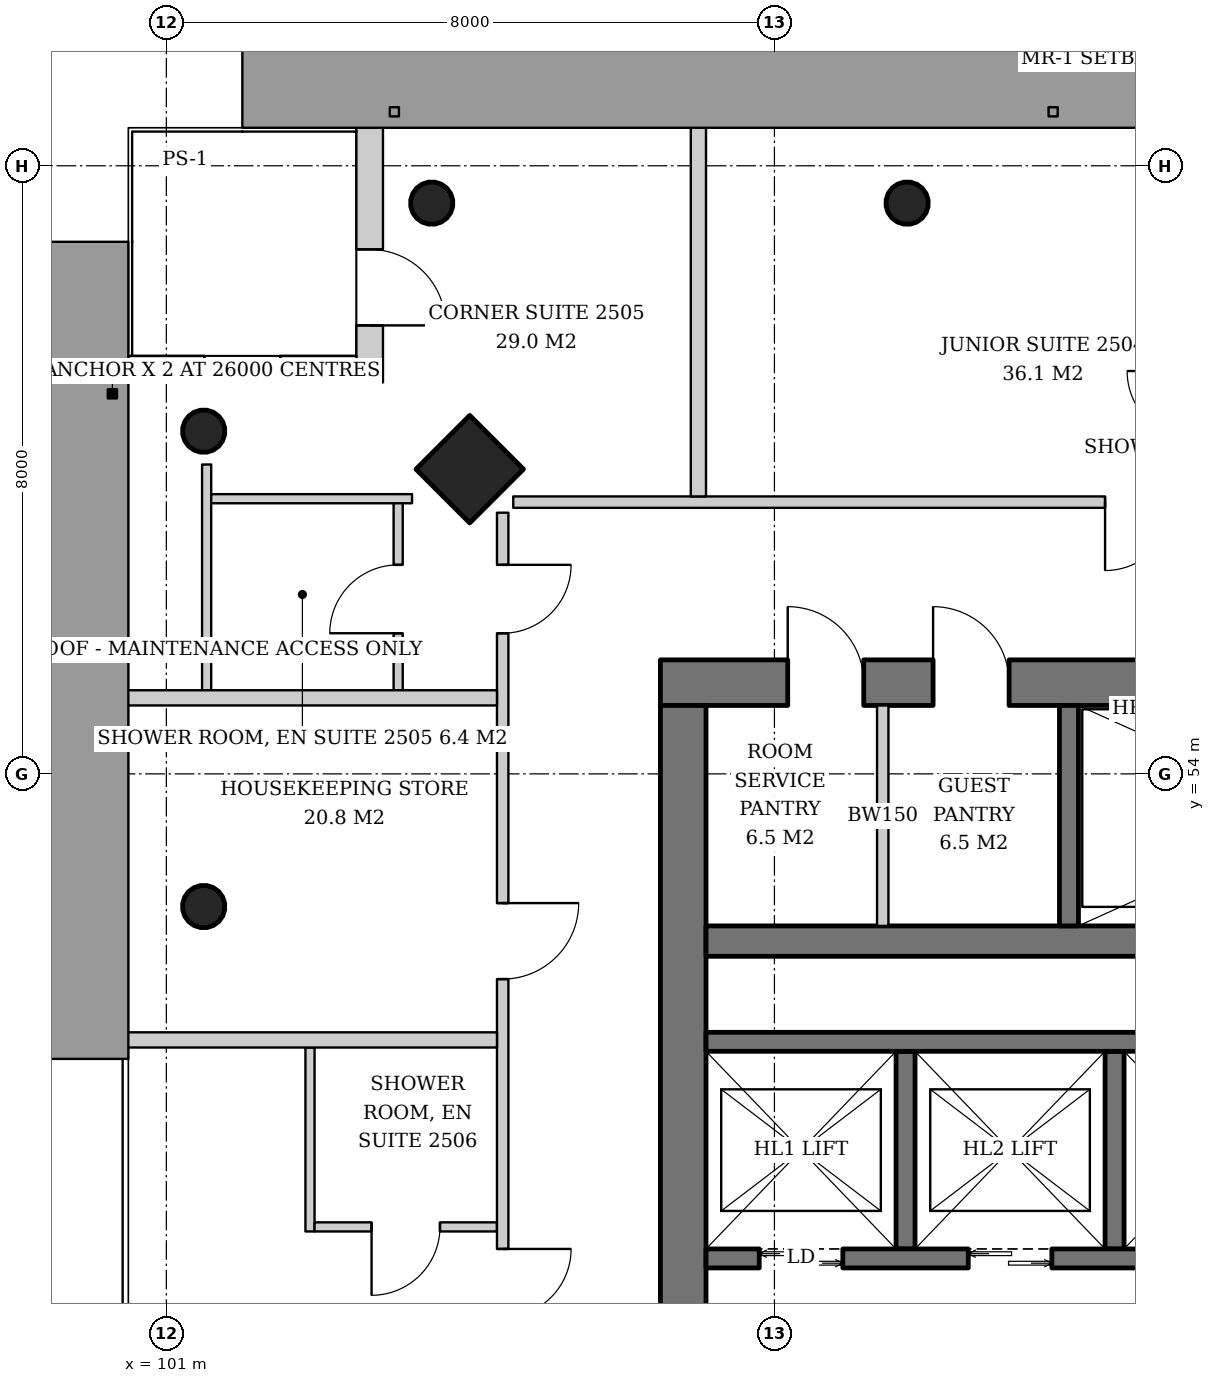
"""IFC4 building model, lengths in metres.
Left out: names, types, materials, properties, quantities, classifications, styles, units other than length and angle.
Written with IfcOpenShell. Run it as: python <this file> out.ifc"""

import sys

from ifc_helpers import new_model, si_unit, direction, frame, frame_2d, origin, origin_2d, place, context, subcontext, project, spatial, rectangle, hollow_circle, extrude, element, fill, save


model = new_model("IFC4")
c1 = context("Model", 3, precision=1e-05, world=origin(), true_north=direction((0.0, 1.0)))
c2 = subcontext(c1, "Body", "Model", "MODEL_VIEW")
j1 = project(units=[si_unit("LENGTHUNIT", "METRE"), si_unit("PLANEANGLEUNIT", "RADIAN")], contexts=[c1])
p1 = place(None, origin())
s1 = spatial("IfcSite", under=j1, at=p1, CompositionType="ELEMENT")
p2 = place(p1, origin())
s2 = spatial("IfcBuilding", under=s1, at=p2, CompositionType="ELEMENT")
p3 = place(p2, frame((0.0, 0.0, 100.8)))
s3 = spatial("IfcBuildingStorey", under=s2, at=p3, CompositionType="ELEMENT", Elevation=100.8)
p4 = place(p3, frame((104.94, 58.06, 0.0), z_axis=(0.043029647111, -0.043029647111, 0.998146732169), x_axis=(0.707106781187, 0.707106781187, 0.0)))
e1 = element("IfcColumn", 1, at=p4, inside=s3, PredefinedType="COLUMN", context=c2, shape_type="SweptSolid", body=[
    extrude(rectangle(XDim=1.0, YDim=1.0, at=origin_2d()), origin(), (0.0, 0.0, 1.0), 3.807),
])
p5 = place(p3, frame((104.44, 61.56, 0.0), z_axis=(0.043029647111, -0.043029647111, 0.998146732169), x_axis=(0.707106781187, 0.707106781187, 0.0)))
e2 = element("IfcColumn", 2, at=p5, inside=s3, PredefinedType="COLUMN", context=c2, shape_type="SweptSolid", body=[
    extrude(hollow_circle(Radius=0.28, WallThickness=0.02, at=origin_2d()), origin(), (0.0, 0.0, 1.0), 3.807),
])
p6 = place(p3, frame((110.72, 61.56, 0.0), z_axis=(0.021561848751, -0.043059525333, 0.998839808957), x_axis=(0.894160516368, 0.44774654769, 0.0)))
e3 = element("IfcColumn", 3, at=p6, inside=s3, PredefinedType="COLUMN", context=c2, shape_type="SweptSolid", body=[
    extrude(hollow_circle(Radius=0.28, WallThickness=0.02, at=origin_2d()), origin(), (0.0, 0.0, 1.0), 3.804),
])
p7 = place(p3, frame((101.44, 58.56, 0.0), z_axis=(0.043029647111, -0.043029647111, 0.998146732169), x_axis=(0.707106781187, 0.707106781187, 0.0)))
e4 = element("IfcColumn", 4, at=p7, inside=s3, PredefinedType="COLUMN", context=c2, shape_type="SweptSolid", body=[
    extrude(hollow_circle(Radius=0.28, WallThickness=0.02, at=origin_2d()), origin(), (0.0, 0.0, 1.0), 3.807),
])
p8 = place(p3, frame((101.44, 52.28, 0.0), z_axis=(0.043059525333, -0.021561848751, 0.998839808957), x_axis=(0.44774654769, 0.894160516368, 0.0)))
e5 = element("IfcColumn", 5, at=p8, inside=s3, PredefinedType="COLUMN", context=c2, shape_type="SweptSolid", body=[
    extrude(hollow_circle(Radius=0.28, WallThickness=0.02, at=origin_2d()), origin(), (0.0, 0.0, 1.0), 3.804),
])
p9 = place(p3, frame((107.5, 55.2, 0.0), z_axis=(0.0, 0.0, 1.0), x_axis=(1.0, 0.0, 0.0)))
e6 = element("IfcWall", 6, at=p9, inside=s3, PredefinedType="SHEAR", context=c2, shape_type="SweptSolid", body=[
    extrude(rectangle(XDim=19.0, YDim=0.6, at=frame_2d((9.5, 0.0))), origin(), (0.0, 0.0, 1.0), 3.8),
])
p10 = place(p9, frame((14.14, 0.0, 0.0)))
e7 = element("IfcOpeningElement", 7, at=p10, cuts=e6, PredefinedType="OPENING", context=c2, shape_type="SweptSolid", body=[
    extrude(rectangle(XDim=1.0, YDim=2.1, at=frame_2d((0.5, 1.05))), frame((0.0, 0.31, 0.0), z_axis=(0.0, -1.0, 0.0), x_axis=(1.0, 0.0, 0.0)), (0.0, 0.0, 1.0), 0.62),
])
p11 = place(p9, frame((1.675, 0.0, 0.0)))
e8 = element("IfcOpeningElement", 8, at=p11, cuts=e6, PredefinedType="OPENING", context=c2, shape_type="SweptSolid", body=[
    extrude(rectangle(XDim=1.0, YDim=2.1, at=frame_2d((0.5, 1.05))), frame((0.0, 0.31, 0.0), z_axis=(0.0, -1.0, 0.0), x_axis=(1.0, 0.0, 0.0)), (0.0, 0.0, 1.0), 0.62),
])
p12 = place(p9, frame((3.587, 0.0, 0.0)))
e9 = element("IfcOpeningElement", 9, at=p12, cuts=e6, PredefinedType="OPENING", context=c2, shape_type="SweptSolid", body=[
    extrude(rectangle(XDim=1.0, YDim=2.1, at=frame_2d((0.5, 1.05))), frame((0.0, 0.31, 0.0), z_axis=(0.0, -1.0, 0.0), x_axis=(1.0, 0.0, 0.0)), (0.0, 0.0, 1.0), 0.62),
])
p13 = place(p3, frame((107.8, 37.1, 0.0), z_axis=(0.0, 0.0, 1.0), x_axis=(0.0, 1.0, 0.0)))
e10 = element("IfcWall", 10, at=p13, inside=s3, PredefinedType="SHEAR", context=c2, shape_type="SweptSolid", body=[
    extrude(rectangle(XDim=17.8, YDim=0.6, at=frame_2d((8.9, 0.0))), origin(), (0.0, 0.0, 1.0), 3.8),
])
p14 = place(p13, frame((8.0, 0.0, 0.0)))
e11 = element("IfcOpeningElement", 11, at=p14, cuts=e10, PredefinedType="OPENING", context=c2, shape_type="SweptSolid", body=[
    extrude(rectangle(XDim=1.8, YDim=2.4, at=frame_2d((0.9, 1.2))), frame((0.0, 0.31, 0.0), z_axis=(0.0, -1.0, 0.0), x_axis=(1.0, 0.0, 0.0)), (0.0, 0.0, 1.0), 0.62),
])
p15 = place(p3, frame((108.1, 51.8, 0.0), z_axis=(0.0, 0.0, 1.0), x_axis=(1.0, 0.0, 0.0)))
e12 = element("IfcWall", 12, at=p15, inside=s3, PredefinedType="SHEAR", context=c2, shape_type="SweptSolid", body=[
    extrude(rectangle(XDim=17.8, YDim=0.4, at=frame_2d((8.9, 0.0))), origin(), (0.0, 0.0, 1.0), 3.8),
])
p16 = place(p3, frame((103.675, 62.5, 0.0), z_axis=(0.0, 0.0, 1.0), x_axis=(0.0, -1.0, 0.0)))
e13 = element("IfcWall", 13, at=p16, inside=s3, PredefinedType="SOLIDWALL", context=c2, shape_type="SweptSolid", body=[
    extrude(rectangle(XDim=3.35, YDim=0.35, at=frame_2d((1.675, 0.0))), origin(), (0.0, 0.0, 1.0), 3.6),
])
p17 = place(p16, frame((1.6, 0.0, 0.0)))
e14 = element("IfcOpeningElement", 14, at=p17, cuts=e13, PredefinedType="OPENING", context=c2, shape_type="SweptSolid", body=[
    extrude(rectangle(XDim=1.0, YDim=2.4, at=frame_2d((0.5, 1.2))), frame((0.0, 0.185, 0.0), z_axis=(0.0, -1.0, 0.0), x_axis=(1.0, 0.0, 0.0)), (0.0, 0.0, 1.0), 0.37),
])
p18 = place(p3, frame((103.5, 59.325, 0.0), z_axis=(0.0, 0.0, 1.0), x_axis=(-1.0, 0.0, 0.0)))
e15 = element("IfcWall", 15, at=p18, inside=s3, PredefinedType="SOLIDWALL", context=c2, shape_type="SweptSolid", body=[
    extrude(rectangle(XDim=3.0, YDim=0.35, at=frame_2d((1.5, 0.0))), origin(), (0.0, 0.0, 1.0), 3.6),
])
p19 = place(p18, frame((1.0, 0.0, 0.9)))
e16 = element("IfcOpeningElement", 16, at=p19, cuts=e15, PredefinedType="OPENING", context=c2, shape_type="SweptSolid", body=[
    extrude(rectangle(XDim=1.0, YDim=2.4, at=frame_2d((0.5, 1.2))), frame((0.0, 0.185, 0.0), z_axis=(0.0, -1.0, 0.0), x_axis=(1.0, 0.0, 0.0)), (0.0, 0.0, 1.0), 0.37),
])
p20 = place(p3, frame((112.875, 52.0, 0.0), z_axis=(0.0, 0.0, 1.0), x_axis=(0.0, 1.0, 0.0)))
e17 = element("IfcWall", 17, at=p20, inside=s3, PredefinedType="SHEAR", context=c2, shape_type="SweptSolid", body=[
    extrude(rectangle(XDim=2.9, YDim=0.25, at=frame_2d((1.45, 0.0))), origin(), (0.0, 0.0, 1.0), 3.8),
])
for number, where, z_axis, x_axis in (
    (18, (110.725, 47.75, 0.0), (0.0, 0.0, 1.0), (0.0, 1.0, 0.0)),
    (19, (113.475, 47.75, 0.0), (0.0, 0.0, 1.0), (0.0, 1.0, 0.0)),
):
    element("IfcWall", number, at=place(p3, frame(where, z_axis=z_axis, x_axis=x_axis)), inside=s3, PredefinedType="SHEAR", context=c2, shape_type="SweptSolid", body=[
        extrude(rectangle(XDim=2.6, YDim=0.25, at=frame_2d((1.3, 0.0))), origin(), (0.0, 0.0, 1.0), 3.8),
    ])
p21 = place(p3, frame((108.1, 50.475, 0.0), z_axis=(0.0, 0.0, 1.0), x_axis=(1.0, 0.0, 0.0)))
e20 = element("IfcWall", 20, at=p21, inside=s3, PredefinedType="SHEAR", context=c2, shape_type="SweptSolid", body=[
    extrude(rectangle(XDim=11.0, YDim=0.25, at=frame_2d((5.5, 0.0))), origin(), (0.0, 0.0, 1.0), 3.8),
])
p22 = place(p3, frame((108.1, 47.625, 0.0), z_axis=(0.0, 0.0, 1.0), x_axis=(1.0, 0.0, 0.0)))
e21 = element("IfcWall", 21, at=p22, inside=s3, PredefinedType="SHEAR", context=c2, shape_type="SweptSolid", body=[
    extrude(rectangle(XDim=12.83, YDim=0.25, at=frame_2d((6.415, 0.0))), origin(), (0.0, 0.0, 1.0), 3.8),
])
p23 = place(p22, frame((0.7, 0.0, 0.0)))
e22 = element("IfcOpeningElement", 22, at=p23, cuts=e21, PredefinedType="OPENING", context=c2, shape_type="SweptSolid", body=[
    extrude(rectangle(XDim=1.1, YDim=2.2, at=frame_2d((0.55, 1.1))), frame((0.0, 0.135, 0.0), z_axis=(0.0, -1.0, 0.0), x_axis=(1.0, 0.0, 0.0)), (0.0, 0.0, 1.0), 0.27),
])
p24 = place(p22, frame((3.45, 0.0, 0.0)))
e23 = element("IfcOpeningElement", 23, at=p24, cuts=e21, PredefinedType="OPENING", context=c2, shape_type="SweptSolid", body=[
    extrude(rectangle(XDim=1.1, YDim=2.2, at=frame_2d((0.55, 1.1))), frame((0.0, 0.135, 0.0), z_axis=(0.0, -1.0, 0.0), x_axis=(1.0, 0.0, 0.0)), (0.0, 0.0, 1.0), 0.27),
])
p25 = place(p22, frame((6.2, 0.0, 0.0)))
e24 = element("IfcOpeningElement", 24, at=p25, cuts=e21, PredefinedType="OPENING", context=c2, shape_type="SweptSolid", body=[
    extrude(rectangle(XDim=1.1, YDim=2.2, at=frame_2d((0.55, 1.1))), frame((0.0, 0.135, 0.0), z_axis=(0.0, -1.0, 0.0), x_axis=(1.0, 0.0, 0.0)), (0.0, 0.0, 1.0), 0.27),
])
p26 = place(p22, frame((8.95, 0.0, 0.0)))
e25 = element("IfcOpeningElement", 25, at=p26, cuts=e21, PredefinedType="OPENING", context=c2, shape_type="SweptSolid", body=[
    extrude(rectangle(XDim=1.1, YDim=2.2, at=frame_2d((0.55, 1.1))), frame((0.0, 0.135, 0.0), z_axis=(0.0, -1.0, 0.0), x_axis=(1.0, 0.0, 0.0)), (0.0, 0.0, 1.0), 0.27),
])
p27 = place(p22, frame((11.515, 0.0, 0.0)))
e26 = element("IfcOpeningElement", 26, at=p27, cuts=e21, PredefinedType="OPENING", context=c2, shape_type="SweptSolid", body=[
    extrude(rectangle(XDim=0.8, YDim=2.0, at=frame_2d((0.4, 1.0))), frame((0.0, 0.135, 0.0), z_axis=(0.0, -1.0, 0.0), x_axis=(1.0, 0.0, 0.0)), (0.0, 0.0, 1.0), 0.27),
])
p28 = place(p3, frame((110.425, 52.0, 0.0), z_axis=(0.0, 0.0, 1.0), x_axis=(0.0, 1.0, 0.0)))
e27 = element("IfcWall", 27, at=p28, inside=s3, PredefinedType="SOLIDWALL", context=c2, shape_type="SweptSolid", body=[
    extrude(rectangle(XDim=2.9, YDim=0.15, at=frame_2d((1.45, 0.0))), origin(), (0.0, 0.0, 1.0), 3.6),
])
p29 = place(p3, frame((128.436, 57.575, 0.0), z_axis=(0.0, 0.0, 1.0), x_axis=(-1.0, 0.0, 0.0)))
e28 = element("IfcWall", 28, at=p29, inside=s3, PredefinedType="PARTITIONING", context=c2, shape_type="SweptSolid", body=[
    extrude(rectangle(XDim=22.872, YDim=0.15, at=frame_2d((11.436, 0.0))), origin(), (0.0, 0.0, 1.0), 2.9),
])
p30 = place(p29, frame((0.686, 0.0, 0.0)))
e29 = element("IfcOpeningElement", 29, at=p30, cuts=e28, PredefinedType="OPENING", context=c2, shape_type="SweptSolid", body=[
    extrude(rectangle(XDim=0.9, YDim=2.1, at=frame_2d((0.45, 1.05))), frame((0.0, 0.085, 0.0), z_axis=(0.0, -1.0, 0.0), x_axis=(1.0, 0.0, 0.0)), (0.0, 0.0, 1.0), 0.17),
])
p31 = place(p29, frame((5.136, 0.0, 0.0)))
e30 = element("IfcOpeningElement", 30, at=p31, cuts=e28, PredefinedType="OPENING", context=c2, shape_type="SweptSolid", body=[
    extrude(rectangle(XDim=1.0, YDim=2.1, at=frame_2d((0.5, 1.05))), frame((0.0, 0.085, 0.0), z_axis=(0.0, -1.0, 0.0), x_axis=(1.0, 0.0, 0.0)), (0.0, 0.0, 1.0), 0.17),
])
p32 = place(p29, frame((14.186, 0.0, 0.0)))
e31 = element("IfcOpeningElement", 31, at=p32, cuts=e28, PredefinedType="OPENING", context=c2, shape_type="SweptSolid", body=[
    extrude(rectangle(XDim=0.9, YDim=2.1, at=frame_2d((0.45, 1.05))), frame((0.0, 0.085, 0.0), z_axis=(0.0, -1.0, 0.0), x_axis=(1.0, 0.0, 0.0)), (0.0, 0.0, 1.0), 0.17),
])
p33 = place(p3, frame((108.0, 57.65, 0.0), z_axis=(0.0, 0.0, 1.0), x_axis=(0.0, 1.0, 0.0)))
e32 = element("IfcWall", 32, at=p33, inside=s3, PredefinedType="PARTITIONING", context=c2, shape_type="SweptSolid", body=[
    extrude(rectangle(XDim=4.89, YDim=0.2, at=frame_2d((2.445, 0.0))), origin(), (0.0, 0.0, 1.0), 3.2),
])
p34 = place(p3, frame((104.05, 55.1, 0.0), z_axis=(0.0, 0.0, 1.0), x_axis=(0.0, 1.0, 0.0)))
e33 = element("IfcWall", 33, at=p34, inside=s3, PredefinedType="PARTITIONING", context=c2, shape_type="SweptSolid", body=[
    extrude(rectangle(XDim=2.58, YDim=0.12, at=frame_2d((1.29, 0.0))), origin(), (0.0, 0.0, 1.0), 2.9),
])
p35 = place(p34, frame((0.75, 0.0, 0.0)))
e34 = element("IfcOpeningElement", 34, at=p35, cuts=e33, PredefinedType="OPENING", context=c2, shape_type="SweptSolid", body=[
    extrude(rectangle(XDim=0.9, YDim=2.1, at=frame_2d((0.45, 1.05))), frame((0.0, 0.07, 0.0), z_axis=(0.0, -1.0, 0.0), x_axis=(1.0, 0.0, 0.0)), (0.0, 0.0, 1.0), 0.14),
])
p36 = place(p3, frame((101.53, 55.1, 0.0), z_axis=(0.0, 0.0, 1.0), x_axis=(0.0, 1.0, 0.0)))
e35 = element("IfcWall", 35, at=p36, inside=s3, PredefinedType="PARTITIONING", context=c2, shape_type="SweptSolid", body=[
    extrude(rectangle(XDim=2.97, YDim=0.12, at=frame_2d((1.485, 0.0))), origin(), (0.0, 0.0, 1.0), 3.2),
])
p37 = place(p3, frame((104.233, 57.62, 0.0), z_axis=(0.0, 0.0, 1.0), x_axis=(-1.0, 0.0, 0.0)))
e36 = element("IfcWall", 36, at=p37, inside=s3, PredefinedType="PARTITIONING", context=c2, shape_type="SweptSolid", body=[
    extrude(rectangle(XDim=2.643, YDim=0.12, at=frame_2d((1.321, 0.0))), origin(), (0.0, 0.0, 1.0), 3.2),
])
p38 = place(p3, frame((102.89, 50.4, 0.0), z_axis=(0.0, 0.0, 1.0), x_axis=(0.0, -1.0, 0.0)))
e37 = element("IfcWall", 37, at=p38, inside=s3, PredefinedType="PARTITIONING", context=c2, shape_type="SweptSolid", body=[
    extrude(rectangle(XDim=2.42, YDim=0.12, at=frame_2d((1.21, 0.0))), origin(), (0.0, 0.0, 1.0), 3.6),
])
p39 = place(p3, frame((105.35, 48.04, 0.0), z_axis=(0.0, 0.0, 1.0), x_axis=(-1.0, 0.0, 0.0)))
e38 = element("IfcWall", 38, at=p39, inside=s3, PredefinedType="PARTITIONING", context=c2, shape_type="SweptSolid", body=[
    extrude(rectangle(XDim=2.4, YDim=0.12, at=frame_2d((1.2, 0.0))), origin(), (0.0, 0.0, 1.0), 3.6),
])
p40 = place(p39, frame((0.75, 0.0, 0.0)))
e39 = element("IfcOpeningElement", 39, at=p40, cuts=e38, PredefinedType="OPENING", context=c2, shape_type="SweptSolid", body=[
    extrude(rectangle(XDim=0.9, YDim=2.1, at=frame_2d((0.45, 1.05))), frame((0.0, 0.07, 0.0), z_axis=(0.0, -1.0, 0.0), x_axis=(1.0, 0.0, 0.0)), (0.0, 0.0, 1.0), 0.14),
])
p41 = place(p3, frame((105.425, 57.436, 0.0), z_axis=(0.0, 0.0, 1.0), x_axis=(0.0, -1.0, 0.0)))
e40 = element("IfcWall", 40, at=p41, inside=s3, PredefinedType="PARTITIONING", context=c2, shape_type="SweptSolid", body=[
    extrude(rectangle(XDim=22.872, YDim=0.15, at=frame_2d((11.436, 0.0))), origin(), (0.0, 0.0, 1.0), 2.9),
])
p42 = place(p41, frame((0.686, 0.0, 0.0)))
e41 = element("IfcOpeningElement", 41, at=p42, cuts=e40, PredefinedType="OPENING", context=c2, shape_type="SweptSolid", body=[
    extrude(rectangle(XDim=0.9, YDim=2.1, at=frame_2d((0.45, 1.05))), frame((0.0, 0.085, 0.0), z_axis=(0.0, -1.0, 0.0), x_axis=(1.0, 0.0, 0.0)), (0.0, 0.0, 1.0), 0.17),
])
p43 = place(p41, frame((5.136, 0.0, 0.0)))
e42 = element("IfcOpeningElement", 42, at=p43, cuts=e40, PredefinedType="OPENING", context=c2, shape_type="SweptSolid", body=[
    extrude(rectangle(XDim=1.0, YDim=2.1, at=frame_2d((0.5, 1.05))), frame((0.0, 0.085, 0.0), z_axis=(0.0, -1.0, 0.0), x_axis=(1.0, 0.0, 0.0)), (0.0, 0.0, 1.0), 0.17),
])
p44 = place(p41, frame((9.686, 0.0, 0.0)))
e43 = element("IfcOpeningElement", 43, at=p44, cuts=e40, PredefinedType="OPENING", context=c2, shape_type="SweptSolid", body=[
    extrude(rectangle(XDim=0.9, YDim=2.1, at=frame_2d((0.45, 1.05))), frame((0.0, 0.085, 0.0), z_axis=(0.0, -1.0, 0.0), x_axis=(1.0, 0.0, 0.0)), (0.0, 0.0, 1.0), 0.17),
])
p45 = place(p41, frame((18.636, 0.0, 0.0)))
e44 = element("IfcOpeningElement", 44, at=p45, cuts=e40, PredefinedType="OPENING", context=c2, shape_type="SweptSolid", body=[
    extrude(rectangle(XDim=1.0, YDim=2.1, at=frame_2d((0.5, 1.05))), frame((0.0, 0.085, 0.0), z_axis=(0.0, -1.0, 0.0), x_axis=(1.0, 0.0, 0.0)), (0.0, 0.0, 1.0), 0.17),
])
p46 = place(p3, frame((105.35, 55.0, 0.0), z_axis=(0.0, 0.0, 1.0), x_axis=(-1.0, 0.0, 0.0)))
e45 = element("IfcWall", 45, at=p46, inside=s3, PredefinedType="PARTITIONING", context=c2, shape_type="SweptSolid", body=[
    extrude(rectangle(XDim=4.89, YDim=0.2, at=frame_2d((2.445, 0.0))), origin(), (0.0, 0.0, 1.0), 2.9),
])
p47 = place(p3, frame((105.35, 50.5, 0.0), z_axis=(0.0, 0.0, 1.0), x_axis=(-1.0, 0.0, 0.0)))
e46 = element("IfcWall", 46, at=p47, inside=s3, PredefinedType="PARTITIONING", context=c2, shape_type="SweptSolid", body=[
    extrude(rectangle(XDim=4.89, YDim=0.2, at=frame_2d((2.445, 0.0))), origin(), (0.0, 0.0, 1.0), 3.2),
])
p48 = place(p17, origin())
e47 = element("IfcDoor", 47, at=p48, inside=s3, OperationType="SINGLE_SWING_RIGHT", PredefinedType="DOOR", context=c2, shape_type="SweptSolid", body=[
    extrude(rectangle(XDim=1.0, YDim=2.4, at=frame_2d((0.5, 1.2))), frame((0.0, 0.025, 0.0), z_axis=(0.0, -1.0, 0.0), x_axis=(1.0, 0.0, 0.0)), (0.0, 0.0, 1.0), 0.05),
])
fill(e14, e47)
p49 = place(p19, origin())
e48 = element("IfcWindow", 48, at=p49, inside=s3, PartitioningType="SINGLE_PANEL", PredefinedType="WINDOW", context=c2, shape_type="SweptSolid", body=[
    extrude(rectangle(XDim=1.0, YDim=2.4, at=frame_2d((0.5, 1.2))), frame((0.0, 0.03, 0.0), z_axis=(0.0, -1.0, 0.0), x_axis=(1.0, 0.0, 0.0)), (0.0, 0.0, 1.0), 0.06),
])
fill(e16, e48)
p50 = place(p23, origin())
e49 = element("IfcDoor", 49, at=p50, inside=s3, OperationType="DOUBLE_DOOR_SLIDING", PredefinedType="DOOR", context=c2, shape_type="SweptSolid", body=[
    extrude(rectangle(XDim=1.1, YDim=2.2, at=frame_2d((0.55, 1.1))), frame((0.0, 0.025, 0.0), z_axis=(0.0, -1.0, 0.0), x_axis=(1.0, 0.0, 0.0)), (0.0, 0.0, 1.0), 0.05),
])
fill(e22, e49)
p51 = place(p24, origin())
e50 = element("IfcDoor", 50, at=p51, inside=s3, OperationType="DOUBLE_DOOR_SLIDING", PredefinedType="DOOR", context=c2, shape_type="SweptSolid", body=[
    extrude(rectangle(XDim=1.1, YDim=2.2, at=frame_2d((0.55, 1.1))), frame((0.0, 0.025, 0.0), z_axis=(0.0, -1.0, 0.0), x_axis=(1.0, 0.0, 0.0)), (0.0, 0.0, 1.0), 0.05),
])
fill(e23, e50)
p52 = place(p11, origin())
e51 = element("IfcDoor", 51, at=p52, inside=s3, OperationType="SINGLE_SWING_LEFT", PredefinedType="DOOR", context=c2, shape_type="SweptSolid", body=[
    extrude(rectangle(XDim=1.0, YDim=2.1, at=frame_2d((0.5, 1.05))), frame((0.0, -0.24, 0.0), z_axis=(0.0, -1.0, 0.0), x_axis=(1.0, 0.0, 0.0)), (0.0, 0.0, 1.0), 0.05),
])
fill(e8, e51)
p53 = place(p12, origin())
e52 = element("IfcDoor", 52, at=p53, inside=s3, OperationType="SINGLE_SWING_LEFT", PredefinedType="DOOR", context=c2, shape_type="SweptSolid", body=[
    extrude(rectangle(XDim=1.0, YDim=2.1, at=frame_2d((0.5, 1.05))), frame((0.0, -0.24, 0.0), z_axis=(0.0, -1.0, 0.0), x_axis=(1.0, 0.0, 0.0)), (0.0, 0.0, 1.0), 0.05),
])
fill(e9, e52)
p54 = place(p32, origin())
e53 = element("IfcDoor", 53, at=p54, inside=s3, OperationType="SINGLE_SWING_RIGHT", PredefinedType="DOOR", context=c2, shape_type="SweptSolid", body=[
    extrude(rectangle(XDim=0.9, YDim=2.1, at=frame_2d((0.45, 1.05))), frame((0.0, 0.025, 0.0), z_axis=(0.0, -1.0, 0.0), x_axis=(1.0, 0.0, 0.0)), (0.0, 0.0, 1.0), 0.05),
])
fill(e31, e53)
p55 = place(p35, origin())
e54 = element("IfcDoor", 54, at=p55, inside=s3, OperationType="SINGLE_SWING_LEFT", PredefinedType="DOOR", context=c2, shape_type="SweptSolid", body=[
    extrude(rectangle(XDim=0.9, YDim=2.1, at=frame_2d((0.45, 1.05))), frame((0.0, 0.025, 0.0), z_axis=(0.0, -1.0, 0.0), x_axis=(1.0, 0.0, 0.0)), (0.0, 0.0, 1.0), 0.05),
])
fill(e34, e54)
p56 = place(p40, origin())
e55 = element("IfcDoor", 55, at=p56, inside=s3, OperationType="SINGLE_SWING_RIGHT", PredefinedType="DOOR", context=c2, shape_type="SweptSolid", body=[
    extrude(rectangle(XDim=0.9, YDim=2.1, at=frame_2d((0.45, 1.05))), frame((0.0, 0.025, 0.0), z_axis=(0.0, -1.0, 0.0), x_axis=(1.0, 0.0, 0.0)), (0.0, 0.0, 1.0), 0.05),
])
fill(e39, e55)
p57 = place(p42, origin())
e56 = element("IfcDoor", 56, at=p57, inside=s3, OperationType="SINGLE_SWING_LEFT", PredefinedType="DOOR", context=c2, shape_type="SweptSolid", body=[
    extrude(rectangle(XDim=0.9, YDim=2.1, at=frame_2d((0.45, 1.05))), frame((0.0, 0.025, 0.0), z_axis=(0.0, -1.0, 0.0), x_axis=(1.0, 0.0, 0.0)), (0.0, 0.0, 1.0), 0.05),
])
fill(e41, e56)
p58 = place(p43, origin())
e57 = element("IfcDoor", 57, at=p58, inside=s3, OperationType="SINGLE_SWING_LEFT", PredefinedType="DOOR", context=c2, shape_type="SweptSolid", body=[
    extrude(rectangle(XDim=1.0, YDim=2.1, at=frame_2d((0.5, 1.05))), frame((0.0, 0.025, 0.0), z_axis=(0.0, -1.0, 0.0), x_axis=(1.0, 0.0, 0.0)), (0.0, 0.0, 1.0), 0.05),
])
fill(e42, e57)
p59 = place(p44, origin())
e58 = element("IfcDoor", 58, at=p59, inside=s3, OperationType="SINGLE_SWING_LEFT", PredefinedType="DOOR", context=c2, shape_type="SweptSolid", body=[
    extrude(rectangle(XDim=0.9, YDim=2.1, at=frame_2d((0.45, 1.05))), frame((0.0, 0.025, 0.0), z_axis=(0.0, -1.0, 0.0), x_axis=(1.0, 0.0, 0.0)), (0.0, 0.0, 1.0), 0.05),
])
fill(e43, e58)
save(model, sys.argv[1])
